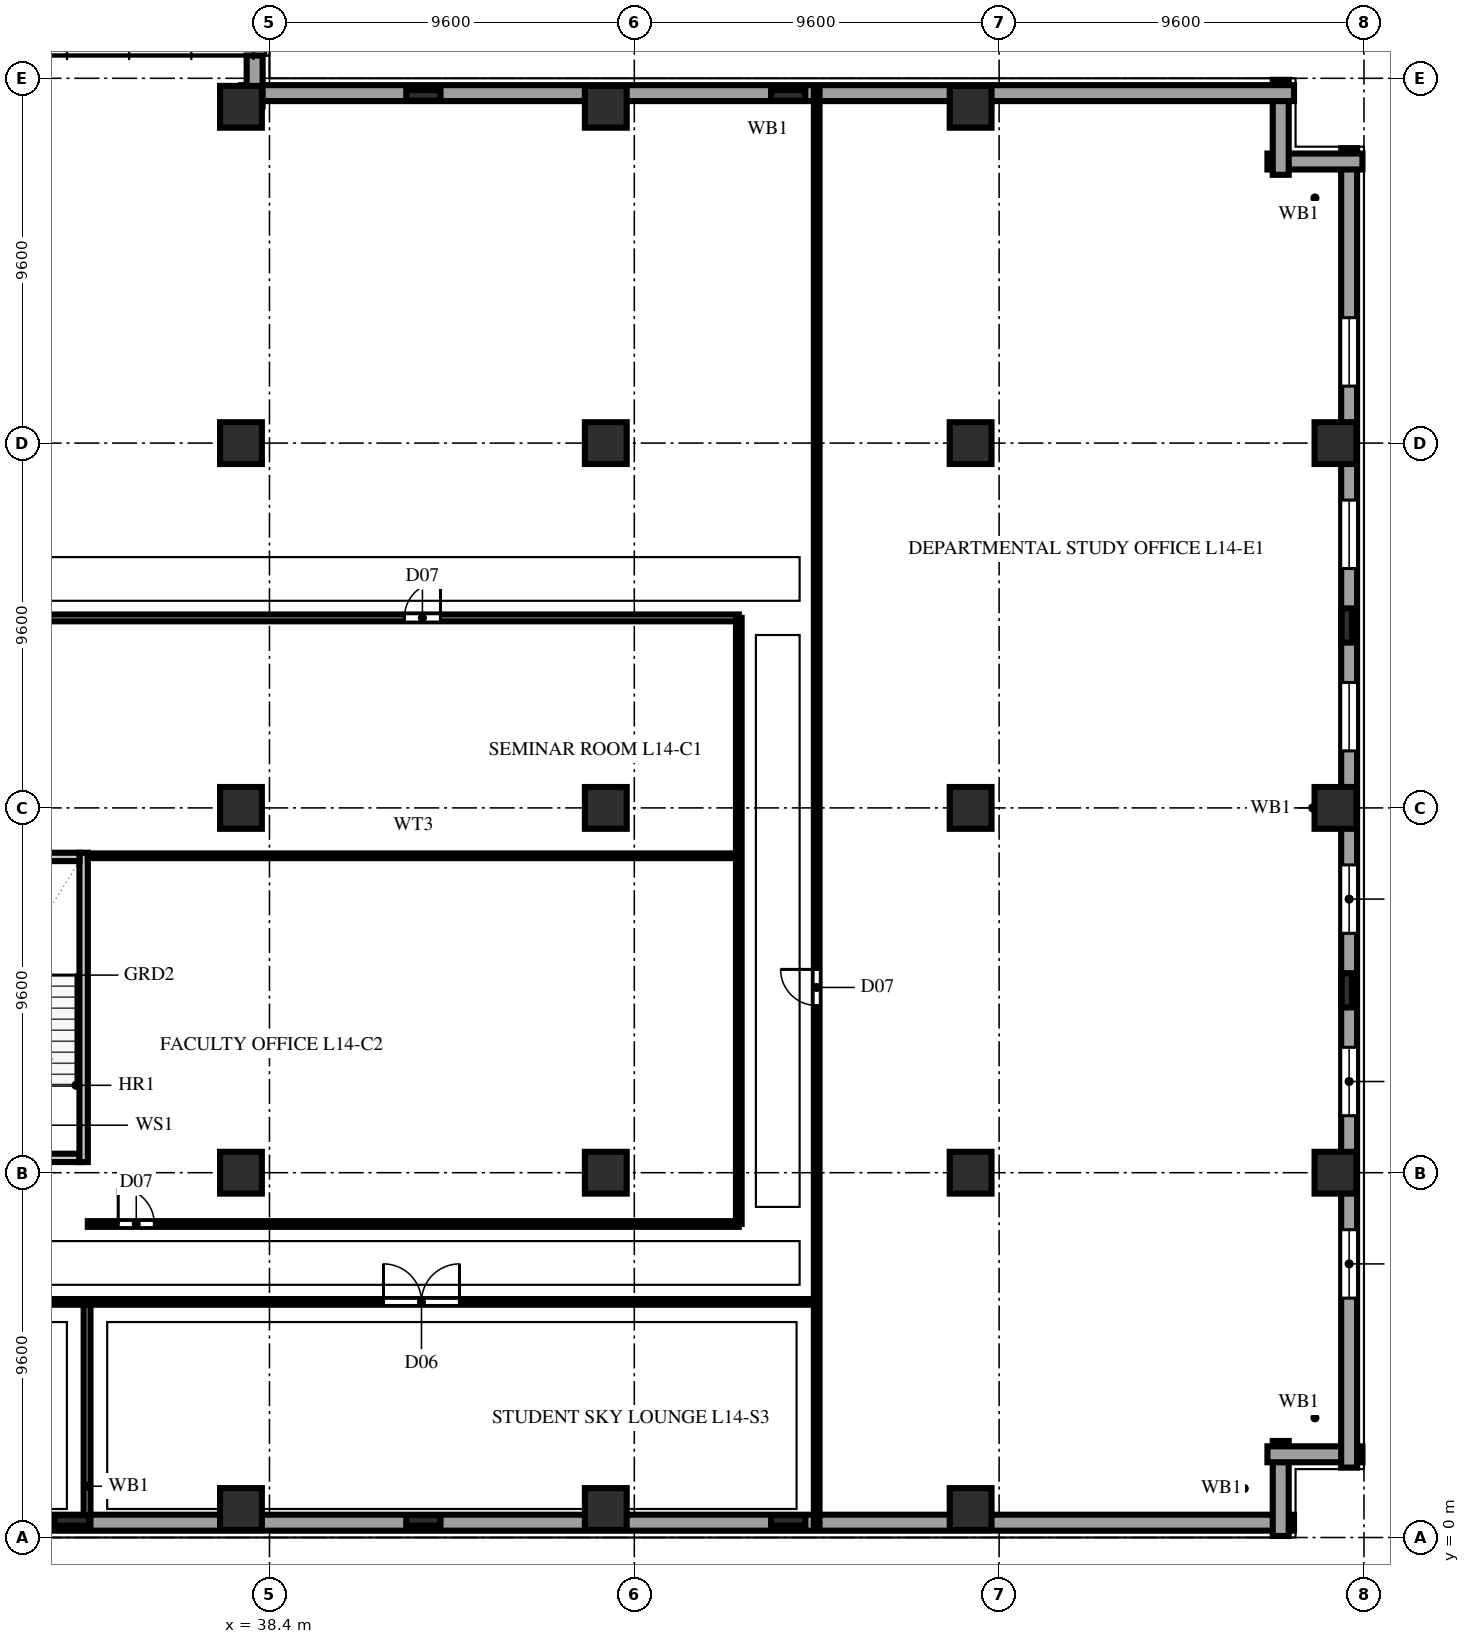
"""IFC4 building model, lengths in metres.
Left out: names, types, materials, properties, quantities, classifications, styles, units other than length and angle.
Written with IfcOpenShell. Run it as: python <this file> out.ifc"""

import sys

from ifc_helpers import new_model, si_unit, direction, frame, frame_2d, origin, origin_2d, place, context, subcontext, project, spatial, rectangle, extrude, element, fill, save


model = new_model("IFC4")
c1 = context("Model", 3, precision=1e-05, world=origin(), true_north=direction((0.0, 1.0)))
c2 = subcontext(c1, "Body", "Model", "MODEL_VIEW")
j1 = project(units=[si_unit("LENGTHUNIT", "METRE"), si_unit("PLANEANGLEUNIT", "RADIAN")], contexts=[c1])
p1 = place(None, origin())
s1 = spatial("IfcSite", under=j1, at=p1, CompositionType="ELEMENT")
p2 = place(p1, origin())
s2 = spatial("IfcBuilding", under=s1, at=p2, CompositionType="ELEMENT")
p3 = place(p2, frame((0.0, 0.0, 58.4)))
s3 = spatial("IfcBuildingStorey", under=s2, at=p3, CompositionType="ELEMENT", Elevation=58.4)
for number, where, z_axis, x_axis in (
    (1, (37.65, 0.75, 0.0), (0.0, 0.0, 1.0), (1.0, 0.0, 0.0)),
    (2, (37.65, 9.6, 0.0), (0.0, 0.0, 1.0), (1.0, 0.0, 0.0)),
    (3, (37.65, 19.2, 0.0), (0.0, 0.0, 1.0), (1.0, 0.0, 0.0)),
    (4, (37.65, 28.8, 0.0), (0.0, 0.0, 1.0), (1.0, 0.0, 0.0)),
    (5, (37.65, 37.65, 0.0), (0.0, 0.0, 1.0), (1.0, 0.0, 0.0)),
    (6, (47.25, 0.75, 0.0), (0.0, 0.0, 1.0), (1.0, 0.0, 0.0)),
    (7, (47.25, 9.6, 0.0), (0.0, 0.0, 1.0), (1.0, 0.0, 0.0)),
    (8, (47.25, 19.2, 0.0), (0.0, 0.0, 1.0), (1.0, 0.0, 0.0)),
    (9, (47.25, 28.8, 0.0), (0.0, 0.0, 1.0), (1.0, 0.0, 0.0)),
    (10, (47.25, 37.65, 0.0), (0.0, 0.0, 1.0), (1.0, 0.0, 0.0)),
    (11, (56.85, 0.75, 0.0), (0.0, 0.0, 1.0), (1.0, 0.0, 0.0)),
    (12, (56.85, 9.6, 0.0), (0.0, 0.0, 1.0), (1.0, 0.0, 0.0)),
    (13, (56.85, 19.2, 0.0), (0.0, 0.0, 1.0), (1.0, 0.0, 0.0)),
    (14, (56.85, 28.8, 0.0), (0.0, 0.0, 1.0), (1.0, 0.0, 0.0)),
    (15, (56.85, 37.65, 0.0), (0.0, 0.0, 1.0), (1.0, 0.0, 0.0)),
    (16, (66.45, 9.6, 0.0), (0.0, 0.0, 1.0), (1.0, 0.0, 0.0)),
    (17, (66.45, 19.2, 0.0), (0.0, 0.0, 1.0), (1.0, 0.0, 0.0)),
    (18, (66.45, 28.8, 0.0), (0.0, 0.0, 1.0), (1.0, 0.0, 0.0)),
):
    element("IfcColumn", number, at=place(p3, frame(where, z_axis=z_axis, x_axis=x_axis)), inside=s3, PredefinedType="COLUMN", context=c2, shape_type="SweptSolid", body=[
        extrude(rectangle(XDim=1.1, YDim=1.1, at=origin_2d()), origin(), (0.0, 0.0, 1.0), 3.8),
    ])
for number, where, z_axis, x_axis in (
    (19, (33.2, 0.45, 0.0), (0.0, 0.0, 1.0), (1.0, 0.0, 0.0)),
    (20, (42.45, 0.45, 0.0), (0.0, 0.0, 1.0), (1.0, 0.0, 0.0)),
    (21, (52.05, 0.45, 0.0), (0.0, 0.0, 1.0), (1.0, 0.0, 0.0)),
    (22, (66.75, 14.4, 0.0), (0.0, 0.0, 1.0), (0.0, 1.0, 0.0)),
    (23, (66.75, 24.0, 0.0), (0.0, 0.0, 1.0), (0.0, 1.0, 0.0)),
    (24, (42.45, 37.95, 0.0), (0.0, 0.0, 1.0), (1.0, 0.0, 0.0)),
    (25, (52.05, 37.95, 0.0), (0.0, 0.0, 1.0), (1.0, 0.0, 0.0)),
):
    element("IfcColumn", number, at=place(p3, frame(where, z_axis=z_axis, x_axis=x_axis)), inside=s3, PredefinedType="PILASTER", context=c2, shape_type="SweptSolid", body=[
        extrude(rectangle(XDim=0.9, YDim=0.28, at=origin_2d()), origin(), (0.0, 0.0, 1.0), 3.8),
    ])
p4 = place(p3, frame((1.84, 0.39, 0.0), z_axis=(0.0, 0.0, 1.0), x_axis=(1.0, 0.0, 0.0)))
e26 = element("IfcWall", 26, at=p4, inside=s3, PredefinedType="SOLIDWALL", context=c2, shape_type="SweptSolid", body=[
    extrude(rectangle(XDim=63.52, YDim=0.42, at=frame_2d((31.76, 0.0))), origin(), (0.0, 0.0, 1.0), 3.54),
])
p5 = place(p4, frame((3.86, 0.0, 0.75)))
e27 = element("IfcOpeningElement", 27, at=p5, cuts=e26, PredefinedType="OPENING", context=c2, shape_type="SweptSolid", body=[
    extrude(rectangle(XDim=3.0, YDim=1.9, at=frame_2d((1.5, 0.95))), frame((0.0, 0.222, 0.0), z_axis=(0.0, -1.0, 0.0), x_axis=(1.0, 0.0, 0.0)), (0.0, 0.0, 1.0), 0.444),
])
p6 = place(p4, frame((8.66, 0.0, 0.75)))
e28 = element("IfcOpeningElement", 28, at=p6, cuts=e26, PredefinedType="OPENING", context=c2, shape_type="SweptSolid", body=[
    extrude(rectangle(XDim=3.0, YDim=1.9, at=frame_2d((1.5, 0.95))), frame((0.0, 0.222, 0.0), z_axis=(0.0, -1.0, 0.0), x_axis=(1.0, 0.0, 0.0)), (0.0, 0.0, 1.0), 0.444),
])
p7 = place(p4, frame((13.46, 0.0, 0.75)))
e29 = element("IfcOpeningElement", 29, at=p7, cuts=e26, PredefinedType="OPENING", context=c2, shape_type="SweptSolid", body=[
    extrude(rectangle(XDim=3.0, YDim=1.9, at=frame_2d((1.5, 0.95))), frame((0.0, 0.222, 0.0), z_axis=(0.0, -1.0, 0.0), x_axis=(1.0, 0.0, 0.0)), (0.0, 0.0, 1.0), 0.444),
])
p8 = place(p4, frame((18.26, 0.0, 0.75)))
e30 = element("IfcOpeningElement", 30, at=p8, cuts=e26, PredefinedType="OPENING", context=c2, shape_type="SweptSolid", body=[
    extrude(rectangle(XDim=3.0, YDim=1.9, at=frame_2d((1.5, 0.95))), frame((0.0, 0.222, 0.0), z_axis=(0.0, -1.0, 0.0), x_axis=(1.0, 0.0, 0.0)), (0.0, 0.0, 1.0), 0.444),
])
p9 = place(p4, frame((23.06, 0.0, 0.75)))
e31 = element("IfcOpeningElement", 31, at=p9, cuts=e26, PredefinedType="OPENING", context=c2, shape_type="SweptSolid", body=[
    extrude(rectangle(XDim=3.0, YDim=1.9, at=frame_2d((1.5, 0.95))), frame((0.0, 0.222, 0.0), z_axis=(0.0, -1.0, 0.0), x_axis=(1.0, 0.0, 0.0)), (0.0, 0.0, 1.0), 0.444),
])
for number, where, z_axis, x_axis in (
    (32, (65.01, 0.04, 0.0), (0.0, 0.0, 1.0), (0.0, 1.0, 0.0)),
    (33, (64.66, 2.19, 0.0), (0.0, 0.0, 1.0), (1.0, 0.0, 0.0)),
):
    element("IfcWall", number, at=place(p3, frame(where, z_axis=z_axis, x_axis=x_axis)), inside=s3, PredefinedType="SOLIDWALL", context=c2, shape_type="SweptSolid", body=[
        extrude(rectangle(XDim=2.5, YDim=0.42, at=frame_2d((1.25, 0.0))), origin(), (0.0, 0.0, 1.0), 3.54),
    ])
p10 = place(p3, frame((66.81, 1.84, 0.0), z_axis=(0.0, 0.0, 1.0), x_axis=(0.0, 1.0, 0.0)))
e34 = element("IfcWall", 34, at=p10, inside=s3, PredefinedType="SOLIDWALL", context=c2, shape_type="SweptSolid", body=[
    extrude(rectangle(XDim=34.72, YDim=0.42, at=frame_2d((17.36, 0.0))), origin(), (0.0, 0.0, 1.0), 3.54),
])
p11 = place(p10, frame((4.46, 0.0, 0.85)))
e35 = element("IfcOpeningElement", 35, at=p11, cuts=e34, PredefinedType="OPENING", context=c2, shape_type="SweptSolid", body=[
    extrude(rectangle(XDim=1.8, YDim=1.85, at=frame_2d((0.9, 0.925))), frame((0.0, 0.222, 0.0), z_axis=(0.0, -1.0, 0.0), x_axis=(1.0, 0.0, 0.0)), (0.0, 0.0, 1.0), 0.444),
])
p12 = place(p10, frame((9.26, 0.0, 0.85)))
e36 = element("IfcOpeningElement", 36, at=p12, cuts=e34, PredefinedType="OPENING", context=c2, shape_type="SweptSolid", body=[
    extrude(rectangle(XDim=1.8, YDim=1.85, at=frame_2d((0.9, 0.925))), frame((0.0, 0.222, 0.0), z_axis=(0.0, -1.0, 0.0), x_axis=(1.0, 0.0, 0.0)), (0.0, 0.0, 1.0), 0.444),
])
p13 = place(p10, frame((14.06, 0.0, 0.85)))
e37 = element("IfcOpeningElement", 37, at=p13, cuts=e34, PredefinedType="OPENING", context=c2, shape_type="SweptSolid", body=[
    extrude(rectangle(XDim=1.8, YDim=1.85, at=frame_2d((0.9, 0.925))), frame((0.0, 0.222, 0.0), z_axis=(0.0, -1.0, 0.0), x_axis=(1.0, 0.0, 0.0)), (0.0, 0.0, 1.0), 0.444),
])
p14 = place(p10, frame((18.86, 0.0, 0.85)))
e38 = element("IfcOpeningElement", 38, at=p14, cuts=e34, PredefinedType="OPENING", context=c2, shape_type="SweptSolid", body=[
    extrude(rectangle(XDim=1.8, YDim=1.85, at=frame_2d((0.9, 0.925))), frame((0.0, 0.222, 0.0), z_axis=(0.0, -1.0, 0.0), x_axis=(1.0, 0.0, 0.0)), (0.0, 0.0, 1.0), 0.444),
])
p15 = place(p10, frame((23.66, 0.0, 0.85)))
e39 = element("IfcOpeningElement", 39, at=p15, cuts=e34, PredefinedType="OPENING", context=c2, shape_type="SweptSolid", body=[
    extrude(rectangle(XDim=1.8, YDim=1.85, at=frame_2d((0.9, 0.925))), frame((0.0, 0.222, 0.0), z_axis=(0.0, -1.0, 0.0), x_axis=(1.0, 0.0, 0.0)), (0.0, 0.0, 1.0), 0.444),
])
p16 = place(p10, frame((28.46, 0.0, 0.85)))
e40 = element("IfcOpeningElement", 40, at=p16, cuts=e34, PredefinedType="OPENING", context=c2, shape_type="SweptSolid", body=[
    extrude(rectangle(XDim=1.8, YDim=1.85, at=frame_2d((0.9, 0.925))), frame((0.0, 0.222, 0.0), z_axis=(0.0, -1.0, 0.0), x_axis=(1.0, 0.0, 0.0)), (0.0, 0.0, 1.0), 0.444),
])
for number, where, z_axis, x_axis in (
    (41, (67.16, 36.21, 0.0), (0.0, 0.0, 1.0), (-1.0, 0.0, 0.0)),
    (42, (65.01, 35.86, 0.0), (0.0, 0.0, 1.0), (0.0, 1.0, 0.0)),
):
    element("IfcWall", number, at=place(p3, frame(where, z_axis=z_axis, x_axis=x_axis)), inside=s3, PredefinedType="SOLIDWALL", context=c2, shape_type="SweptSolid", body=[
        extrude(rectangle(XDim=2.5, YDim=0.42, at=frame_2d((1.25, 0.0))), origin(), (0.0, 0.0, 1.0), 3.54),
    ])
p17 = place(p3, frame((65.36, 38.01, 0.0), z_axis=(0.0, 0.0, 1.0), x_axis=(-1.0, 0.0, 0.0)))
e43 = element("IfcWall", 43, at=p17, inside=s3, PredefinedType="SOLIDWALL", context=c2, shape_type="SweptSolid", body=[
    extrude(rectangle(XDim=27.7, YDim=0.42, at=frame_2d((13.85, 0.0))), origin(), (0.0, 0.0, 1.0), 3.54),
])
p18 = place(p3, frame((38.01, 37.66, 0.0), z_axis=(0.0, 0.0, 1.0), x_axis=(0.0, 1.0, 0.0)))
e44 = element("IfcWall", 44, at=p18, inside=s3, PredefinedType="SOLIDWALL", context=c2, shape_type="SweptSolid", body=[
    extrude(rectangle(XDim=1.34, YDim=0.42, at=frame_2d((0.67, 0.0))), origin(), (0.0, 0.0, 1.0), 3.54),
])
p19 = place(p3, frame((29.75, 9.99, 0.0), z_axis=(0.0, 0.0, 1.0), x_axis=(1.0, 0.0, 0.0)))
e45 = element("IfcWall", 45, at=p19, inside=s3, PredefinedType="SOLIDWALL", context=c2, shape_type="SweptSolid", body=[
    extrude(rectangle(XDim=3.65, YDim=0.22, at=frame_2d((1.825, 0.0))), origin(), (0.0, 0.0, 1.0), 3.54),
])
p20 = place(p19, frame((1.24, 0.0, 0.0)))
e46 = element("IfcOpeningElement", 46, at=p20, cuts=e45, PredefinedType="OPENING", context=c2, shape_type="SweptSolid", body=[
    extrude(rectangle(XDim=1.1, YDim=2.2, at=frame_2d((0.55, 1.1))), frame((0.0, 0.122, 0.0), z_axis=(0.0, -1.0, 0.0), x_axis=(1.0, 0.0, 0.0)), (0.0, 0.0, 1.0), 0.244),
])
p21 = place(p3, frame((33.51, 9.88, 0.0), z_axis=(0.0, 0.0, 1.0), x_axis=(0.0, 1.0, 0.0)))
e47 = element("IfcWall", 47, at=p21, inside=s3, PredefinedType="SOLIDWALL", context=c2, shape_type="SweptSolid", body=[
    extrude(rectangle(XDim=8.14, YDim=0.22, at=frame_2d((4.07, 0.0))), origin(), (0.0, 0.0, 1.0), 3.54),
])
p22 = place(p3, frame((29.75, 17.91, 0.0), z_axis=(0.0, 0.0, 1.0), x_axis=(1.0, 0.0, 0.0)))
e48 = element("IfcWall", 48, at=p22, inside=s3, PredefinedType="SOLIDWALL", context=c2, shape_type="SweptSolid", body=[
    extrude(rectangle(XDim=3.65, YDim=0.22, at=frame_2d((1.825, 0.0))), origin(), (0.0, 0.0, 1.0), 3.54),
])
p23 = place(p3, frame((33.6, 0.22, 0.0), z_axis=(0.0, 0.0, 1.0), x_axis=(0.0, 1.0, 0.0)))
e49 = element("IfcWall", 49, at=p23, inside=s3, PredefinedType="PARTITIONING", context=c2, shape_type="SweptSolid", body=[
    extrude(rectangle(XDim=5.98, YDim=0.18, at=frame_2d((2.99, 0.0))), origin(), (0.0, 0.0, 1.0), 3.54),
])
p24 = place(p3, frame((0.22, 6.2, 0.0), z_axis=(0.0, 0.0, 1.0), x_axis=(1.0, 0.0, 0.0)))
e50 = element("IfcWall", 50, at=p24, inside=s3, PredefinedType="PARTITIONING", context=c2, shape_type="SweptSolid", body=[
    extrude(rectangle(XDim=52.58, YDim=0.15, at=frame_2d((26.29, 0.0))), origin(), (0.0, 0.0, 1.0), 3.54),
])
p25 = place(p24, frame((13.58, 0.0, 0.0)))
e51 = element("IfcOpeningElement", 51, at=p25, cuts=e50, PredefinedType="OPENING", context=c2, shape_type="SweptSolid", body=[
    extrude(rectangle(XDim=1.2, YDim=2.2, at=frame_2d((0.6, 1.1))), frame((0.0, 0.087, 0.0), z_axis=(0.0, -1.0, 0.0), x_axis=(1.0, 0.0, 0.0)), (0.0, 0.0, 1.0), 0.174),
])
p26 = place(p24, frame((23.28, 0.0, 0.0)))
e52 = element("IfcOpeningElement", 52, at=p26, cuts=e50, PredefinedType="OPENING", context=c2, shape_type="SweptSolid", body=[
    extrude(rectangle(XDim=1.2, YDim=2.2, at=frame_2d((0.6, 1.1))), frame((0.0, 0.087, 0.0), z_axis=(0.0, -1.0, 0.0), x_axis=(1.0, 0.0, 0.0)), (0.0, 0.0, 1.0), 0.174),
])
p27 = place(p24, frame((41.18, 0.0, 0.0)))
e53 = element("IfcOpeningElement", 53, at=p27, cuts=e50, PredefinedType="OPENING", context=c2, shape_type="SweptSolid", body=[
    extrude(rectangle(XDim=2.0, YDim=2.3, at=frame_2d((1.0, 1.15))), frame((0.0, 0.087, 0.0), z_axis=(0.0, -1.0, 0.0), x_axis=(1.0, 0.0, 0.0)), (0.0, 0.0, 1.0), 0.174),
])
p28 = place(p3, frame((52.8, 0.22, 0.0), z_axis=(0.0, 0.0, 1.0), x_axis=(0.0, 1.0, 0.0)))
e54 = element("IfcWall", 54, at=p28, inside=s3, PredefinedType="PARTITIONING", context=c2, shape_type="SweptSolid", body=[
    extrude(rectangle(XDim=37.96, YDim=0.15, at=frame_2d((18.98, 0.0))), origin(), (0.0, 0.0, 1.0), 3.54),
])
p29 = place(p28, frame((13.78, 0.0, 0.0)))
e55 = element("IfcOpeningElement", 55, at=p29, cuts=e54, PredefinedType="OPENING", context=c2, shape_type="SweptSolid", body=[
    extrude(rectangle(XDim=0.95, YDim=2.15, at=frame_2d((0.475, 1.075))), frame((0.0, 0.087, 0.0), z_axis=(0.0, -1.0, 0.0), x_axis=(1.0, 0.0, 0.0)), (0.0, 0.0, 1.0), 0.174),
])
p30 = place(p3, frame((19.28, 24.2, 0.0), z_axis=(0.0, 0.0, 1.0), x_axis=(1.0, 0.0, 0.0)))
e56 = element("IfcWall", 56, at=p30, inside=s3, PredefinedType="PARTITIONING", context=c2, shape_type="SweptSolid", body=[
    extrude(rectangle(XDim=31.47, YDim=0.18, at=frame_2d((15.735, 0.0))), origin(), (0.0, 0.0, 1.0), 3.54),
])
p31 = place(p30, frame((22.67, 0.0, 0.0)))
e57 = element("IfcOpeningElement", 57, at=p31, cuts=e56, PredefinedType="OPENING", context=c2, shape_type="SweptSolid", body=[
    extrude(rectangle(XDim=0.95, YDim=2.15, at=frame_2d((0.475, 1.075))), frame((0.0, 0.102, 0.0), z_axis=(0.0, -1.0, 0.0), x_axis=(1.0, 0.0, 0.0)), (0.0, 0.0, 1.0), 0.204),
])
p32 = place(p3, frame((33.62, 17.94, 0.0), z_axis=(0.0, 0.0, 1.0), x_axis=(1.0, 0.0, 0.0)))
e58 = element("IfcWall", 58, at=p32, inside=s3, PredefinedType="PARTITIONING", context=c2, shape_type="SweptSolid", body=[
    extrude(rectangle(XDim=17.13, YDim=0.125, at=frame_2d((8.565, 0.0))), origin(), (0.0, 0.0, 1.0), 3.54),
])
p33 = place(p3, frame((33.62, 8.25, 0.0), z_axis=(0.0, 0.0, 1.0), x_axis=(1.0, 0.0, 0.0)))
e59 = element("IfcWall", 59, at=p33, inside=s3, PredefinedType="PARTITIONING", context=c2, shape_type="SweptSolid", body=[
    extrude(rectangle(XDim=17.13, YDim=0.15, at=frame_2d((8.565, 0.0))), origin(), (0.0, 0.0, 1.0), 3.54),
])
p34 = place(p33, frame((0.8, 0.0, 0.0)))
e60 = element("IfcOpeningElement", 60, at=p34, cuts=e59, PredefinedType="OPENING", context=c2, shape_type="SweptSolid", body=[
    extrude(rectangle(XDim=0.95, YDim=2.15, at=frame_2d((0.475, 1.075))), frame((0.0, 0.087, 0.0), z_axis=(0.0, -1.0, 0.0), x_axis=(1.0, 0.0, 0.0)), (0.0, 0.0, 1.0), 0.174),
])
p35 = place(p3, frame((50.75, 8.25, 0.0), z_axis=(0.0, 0.0, 1.0), x_axis=(0.0, 1.0, 0.0)))
e61 = element("IfcWall", 61, at=p35, inside=s3, PredefinedType="PARTITIONING", context=c2, shape_type="SweptSolid", body=[
    extrude(rectangle(XDim=15.95, YDim=0.15, at=frame_2d((7.975, 0.0))), origin(), (0.0, 0.0, 1.0), 3.54),
])
p36 = place(p11, origin())
e62 = element("IfcWindow", 62, at=p36, inside=s3, PartitioningType="DOUBLE_PANEL_VERTICAL", PredefinedType="WINDOW", context=c2, shape_type="SweptSolid", body=[
    extrude(rectangle(XDim=1.8, YDim=1.85, at=frame_2d((0.9, 0.925))), frame((0.0, 0.11, 0.0), z_axis=(0.0, -1.0, 0.0), x_axis=(1.0, 0.0, 0.0)), (0.0, 0.0, 1.0), 0.06),
])
fill(e35, e62)
p37 = place(p12, origin())
e63 = element("IfcWindow", 63, at=p37, inside=s3, PartitioningType="DOUBLE_PANEL_VERTICAL", PredefinedType="WINDOW", context=c2, shape_type="SweptSolid", body=[
    extrude(rectangle(XDim=1.8, YDim=1.85, at=frame_2d((0.9, 0.925))), frame((0.0, 0.11, 0.0), z_axis=(0.0, -1.0, 0.0), x_axis=(1.0, 0.0, 0.0)), (0.0, 0.0, 1.0), 0.06),
])
fill(e36, e63)
p38 = place(p13, origin())
e64 = element("IfcWindow", 64, at=p38, inside=s3, PartitioningType="DOUBLE_PANEL_VERTICAL", PredefinedType="WINDOW", context=c2, shape_type="SweptSolid", body=[
    extrude(rectangle(XDim=1.8, YDim=1.85, at=frame_2d((0.9, 0.925))), frame((0.0, 0.11, 0.0), z_axis=(0.0, -1.0, 0.0), x_axis=(1.0, 0.0, 0.0)), (0.0, 0.0, 1.0), 0.06),
])
fill(e37, e64)
p39 = place(p14, origin())
e65 = element("IfcWindow", 65, at=p39, inside=s3, PartitioningType="DOUBLE_PANEL_VERTICAL", PredefinedType="WINDOW", context=c2, shape_type="SweptSolid", body=[
    extrude(rectangle(XDim=1.8, YDim=1.85, at=frame_2d((0.9, 0.925))), frame((0.0, 0.11, 0.0), z_axis=(0.0, -1.0, 0.0), x_axis=(1.0, 0.0, 0.0)), (0.0, 0.0, 1.0), 0.06),
])
fill(e38, e65)
p40 = place(p15, origin())
e66 = element("IfcWindow", 66, at=p40, inside=s3, PartitioningType="DOUBLE_PANEL_VERTICAL", PredefinedType="WINDOW", context=c2, shape_type="SweptSolid", body=[
    extrude(rectangle(XDim=1.8, YDim=1.85, at=frame_2d((0.9, 0.925))), frame((0.0, 0.11, 0.0), z_axis=(0.0, -1.0, 0.0), x_axis=(1.0, 0.0, 0.0)), (0.0, 0.0, 1.0), 0.06),
])
fill(e39, e66)
p41 = place(p16, origin())
e67 = element("IfcWindow", 67, at=p41, inside=s3, PartitioningType="DOUBLE_PANEL_VERTICAL", PredefinedType="WINDOW", context=c2, shape_type="SweptSolid", body=[
    extrude(rectangle(XDim=1.8, YDim=1.85, at=frame_2d((0.9, 0.925))), frame((0.0, 0.11, 0.0), z_axis=(0.0, -1.0, 0.0), x_axis=(1.0, 0.0, 0.0)), (0.0, 0.0, 1.0), 0.06),
])
fill(e40, e67)
p42 = place(p27, origin())
e68 = element("IfcDoor", 68, at=p42, inside=s3, OperationType="DOUBLE_SWING_LEFT", PredefinedType="DOOR", context=c2, shape_type="SweptSolid", body=[
    extrude(rectangle(XDim=2.0, YDim=2.3, at=frame_2d((1.0, 1.15))), frame((0.0, 0.025, 0.0), z_axis=(0.0, -1.0, 0.0), x_axis=(1.0, 0.0, 0.0)), (0.0, 0.0, 1.0), 0.05),
])
fill(e53, e68)
p43 = place(p29, origin())
e69 = element("IfcDoor", 69, at=p43, inside=s3, OperationType="SINGLE_SWING_RIGHT", PredefinedType="DOOR", context=c2, shape_type="SweptSolid", body=[
    extrude(rectangle(XDim=0.95, YDim=2.15, at=frame_2d((0.475, 1.075))), frame((0.0, 0.025, 0.0), z_axis=(0.0, -1.0, 0.0), x_axis=(1.0, 0.0, 0.0)), (0.0, 0.0, 1.0), 0.05),
])
fill(e55, e69)
p44 = place(p31, origin())
e70 = element("IfcDoor", 70, at=p44, inside=s3, OperationType="SINGLE_SWING_RIGHT", PredefinedType="DOOR", context=c2, shape_type="SweptSolid", body=[
    extrude(rectangle(XDim=0.95, YDim=2.15, at=frame_2d((0.475, 1.075))), frame((0.0, 0.025, 0.0), z_axis=(0.0, -1.0, 0.0), x_axis=(1.0, 0.0, 0.0)), (0.0, 0.0, 1.0), 0.05),
])
fill(e57, e70)
p45 = place(p34, origin())
e71 = element("IfcDoor", 71, at=p45, inside=s3, OperationType="SINGLE_SWING_LEFT", PredefinedType="DOOR", context=c2, shape_type="SweptSolid", body=[
    extrude(rectangle(XDim=0.95, YDim=2.15, at=frame_2d((0.475, 1.075))), frame((0.0, 0.025, 0.0), z_axis=(0.0, -1.0, 0.0), x_axis=(1.0, 0.0, 0.0)), (0.0, 0.0, 1.0), 0.05),
])
fill(e60, e71)
save(model, sys.argv[1])
